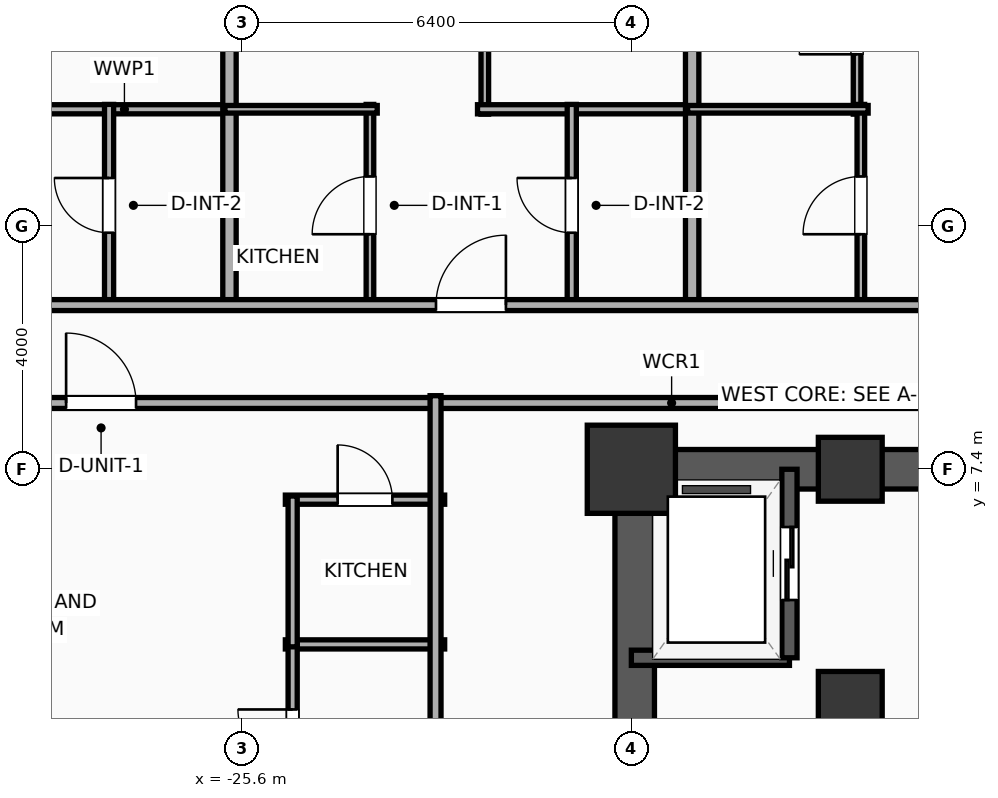
"""IFC4 building model, lengths in metres.
Left out: names, types, materials, properties, quantities, classifications, styles, units other than length and angle.
Written with IfcOpenShell. Run it as: python <this file> out.ifc"""

import sys

from ifc_helpers import new_model, si_unit, direction, frame, frame_2d, origin, origin_2d, place, context, subcontext, project, spatial, rectangle, extrude, element, fill, save


model = new_model("IFC4")
c1 = context("Model", 3, precision=1e-05, world=origin(), true_north=direction((0.0, 1.0)))
c2 = subcontext(c1, "Body", "Model", "MODEL_VIEW")
j1 = project(units=[si_unit("LENGTHUNIT", "METRE"), si_unit("PLANEANGLEUNIT", "RADIAN")], contexts=[c1])
p1 = place(None, origin())
s1 = spatial("IfcSite", under=j1, at=p1, CompositionType="ELEMENT")
p2 = place(p1, origin())
s2 = spatial("IfcBuilding", under=s1, at=p2, CompositionType="ELEMENT")
p3 = place(p2, frame((0.0, 0.0, 45.5)))
s3 = spatial("IfcBuildingStorey", under=s2, at=p3, CompositionType="ELEMENT", Elevation=45.5)
p4 = place(p3, frame((-19.2, 7.4, 0.0), z_axis=(0.0, 0.0, 1.0), x_axis=(1.0, 0.0, 0.0)))
e1 = element("IfcColumn", 1, at=p4, inside=s3, PredefinedType="COLUMN", context=c2, shape_type="SweptSolid", body=[
    extrude(rectangle(XDim=1.45, YDim=1.45, at=origin_2d()), origin(), (0.0, 0.0, 1.0), 3.9),
])
for number, where, z_axis, x_axis in (
    (2, (-15.6, 7.4, 0.0), (0.0, 0.0, 1.0), (1.0, 0.0, 0.0)),
    (3, (-15.6, 3.55, 0.0), (0.0, 0.0, 1.0), (1.0, 0.0, 0.0)),
):
    element("IfcColumn", number, at=place(p3, frame(where, z_axis=z_axis, x_axis=x_axis)), inside=s3, PredefinedType="COLUMN", context=c2, shape_type="SweptSolid", body=[
        extrude(rectangle(XDim=1.05, YDim=1.05, at=origin_2d()), origin(), (0.0, 0.0, 1.0), 3.9),
    ])
p5 = place(p3, frame((-19.525, 7.4, 0.0), z_axis=(0.0, 0.0, 1.0), x_axis=(1.0, 0.0, 0.0)))
e4 = element("IfcWall", 4, at=p5, inside=s3, PredefinedType="SHEAR", context=c2, shape_type="SweptSolid", body=[
    extrude(rectangle(XDim=7.45, YDim=0.65, at=frame_2d((3.725, 0.0))), origin(), (0.0, 0.0, 1.0), 3.65),
])
p6 = place(p3, frame((-19.145, -7.4, 0.0), z_axis=(0.0, 0.0, 1.0), x_axis=(0.0, 1.0, 0.0)))
e5 = element("IfcWall", 5, at=p6, inside=s3, PredefinedType="SHEAR", context=c2, shape_type="SweptSolid", body=[
    extrude(rectangle(XDim=14.8, YDim=0.65, at=frame_2d((7.4, 0.0))), origin(), (0.0, 0.0, 1.0), 3.65),
])
p7 = place(p3, frame((-19.2, 4.3, 0.0), z_axis=(0.0, 0.0, 1.0), x_axis=(1.0, 0.0, 0.0)))
e6 = element("IfcWall", 6, at=p7, inside=s3, PredefinedType="SOLIDWALL", context=c2, shape_type="SweptSolid", body=[
    extrude(rectangle(XDim=2.6, YDim=0.25, at=frame_2d((1.3, 0.0))), origin(), (0.0, 0.0, 1.0), 3.65),
])
p8 = place(p3, frame((-16.6, 4.3, 0.0), z_axis=(0.0, 0.0, 1.0), x_axis=(0.0, 1.0, 0.0)))
e7 = element("IfcWall", 7, at=p8, inside=s3, PredefinedType="SOLIDWALL", context=c2, shape_type="SweptSolid", body=[
    extrude(rectangle(XDim=3.1, YDim=0.25, at=frame_2d((1.55, 0.0))), origin(), (0.0, 0.0, 1.0), 3.65),
])
p9 = place(p8, frame((0.95, 0.0, 0.0)))
e8 = element("IfcOpeningElement", 8, at=p9, cuts=e7, PredefinedType="OPENING", context=c2, shape_type="SweptSolid", body=[
    extrude(rectangle(XDim=1.2, YDim=2.05, at=frame_2d((0.6, 1.025))), frame((0.0, 0.135, 0.0), z_axis=(0.0, -1.0, 0.0), x_axis=(1.0, 0.0, 0.0)), (0.0, 0.0, 1.0), 0.27),
])
p10 = place(p3, frame((-33.41, 8.49, 0.0), z_axis=(0.0, 0.0, 1.0), x_axis=(1.0, 0.0, 0.0)))
e9 = element("IfcWall", 9, at=p10, inside=s3, PredefinedType="PARTITIONING", context=c2, shape_type="SweptSolid", body=[
    extrude(rectangle(XDim=23.53, YDim=0.18, at=frame_2d((11.765, 0.0))), origin(), (0.0, 0.0, 1.0), 3.65),
])
p11 = place(p10, frame((4.915, 0.0, 0.0)))
e10 = element("IfcOpeningElement", 10, at=p11, cuts=e9, PredefinedType="OPENING", context=c2, shape_type="SweptSolid", body=[
    extrude(rectangle(XDim=1.15, YDim=2.05, at=frame_2d((0.575, 1.025))), frame((0.0, 0.1, 0.0), z_axis=(0.0, -1.0, 0.0), x_axis=(1.0, 0.0, 0.0)), (0.0, 0.0, 1.0), 0.2),
])
p12 = place(p3, frame((-29.339, 13.32, 0.0), z_axis=(0.0, 0.0, 1.0), x_axis=(1.0, 0.0, 0.0)))
e11 = element("IfcWall", 11, at=p12, inside=s3, PredefinedType="PLUMBINGWALL", context=c2, shape_type="SweptSolid", body=[
    extrude(rectangle(XDim=3.605, YDim=0.15, at=frame_2d((1.803, 0.0))), origin(), (0.0, 0.0, 1.0), 3.65),
])
p13 = place(p3, frame((-27.789, 10.08, 0.0), z_axis=(0.0, 0.0, 1.0), x_axis=(0.0, 1.0, 0.0)))
e12 = element("IfcWall", 12, at=p13, inside=s3, PredefinedType="PLUMBINGWALL", context=c2, shape_type="SweptSolid", body=[
    extrude(rectangle(XDim=3.32, YDim=0.15, at=frame_2d((1.66, 0.0))), origin(), (0.0, 0.0, 1.0), 3.65),
])
p14 = place(p13, frame((1.21, 0.0, 0.0)))
e13 = element("IfcOpeningElement", 13, at=p14, cuts=e12, PredefinedType="OPENING", context=c2, shape_type="SweptSolid", body=[
    extrude(rectangle(XDim=0.9, YDim=2.05, at=frame_2d((0.45, 1.025))), frame((0.0, 0.085, 0.0), z_axis=(0.0, -1.0, 0.0), x_axis=(1.0, 0.0, 0.0)), (0.0, 0.0, 1.0), 0.17),
])
p15 = place(p3, frame((-25.809, 10.02, 0.0), z_axis=(0.0, 0.0, 1.0), x_axis=(0.0, 1.0, 0.0)))
e14 = element("IfcWall", 14, at=p15, inside=s3, PredefinedType="PARTITIONING", context=c2, shape_type="SweptSolid", body=[
    extrude(rectangle(XDim=12.19, YDim=0.22, at=frame_2d((6.095, 0.0))), origin(), (0.0, 0.0, 1.0), 3.65),
])
p16 = place(p3, frame((-21.61, 13.24, 0.0), z_axis=(0.0, 0.0, 1.0), x_axis=(0.0, 1.0, 0.0)))
e15 = element("IfcWall", 15, at=p16, inside=s3, PredefinedType="PARTITIONING", context=c2, shape_type="SweptSolid", body=[
    extrude(rectangle(XDim=9.12, YDim=0.125, at=frame_2d((4.56, 0.0))), origin(), (0.0, 0.0, 1.0), 3.65),
])
p17 = place(p16, frame((1.739, 0.0, 0.0)))
e16 = element("IfcOpeningElement", 16, at=p17, cuts=e15, PredefinedType="OPENING", context=c2, shape_type="SweptSolid", body=[
    extrude(rectangle(XDim=0.9, YDim=2.05, at=frame_2d((0.45, 1.025))), frame((0.0, 0.073, 0.0), z_axis=(0.0, -1.0, 0.0), x_axis=(1.0, 0.0, 0.0)), (0.0, 0.0, 1.0), 0.145),
])
p18 = place(p3, frame((-21.73, 13.32, 0.0), z_axis=(0.0, 0.0, 1.0), x_axis=(1.0, 0.0, 0.0)))
e17 = element("IfcWall", 17, at=p18, inside=s3, PredefinedType="PLUMBINGWALL", context=c2, shape_type="SweptSolid", body=[
    extrude(rectangle(XDim=3.605, YDim=0.15, at=frame_2d((1.802, 0.0))), origin(), (0.0, 0.0, 1.0), 3.65),
])
p19 = place(p3, frame((-23.499, 10.08, 0.0), z_axis=(0.0, 0.0, 1.0), x_axis=(0.0, 1.0, 0.0)))
e18 = element("IfcWall", 18, at=p19, inside=s3, PredefinedType="PARTITIONING", context=c2, shape_type="SweptSolid", body=[
    extrude(rectangle(XDim=3.32, YDim=0.125, at=frame_2d((1.66, 0.0))), origin(), (0.0, 0.0, 1.0), 3.65),
])
p20 = place(p19, frame((1.185, 0.0, 0.0)))
e19 = element("IfcOpeningElement", 19, at=p20, cuts=e18, PredefinedType="OPENING", context=c2, shape_type="SweptSolid", body=[
    extrude(rectangle(XDim=0.95, YDim=2.05, at=frame_2d((0.475, 1.025))), frame((0.0, 0.073, 0.0), z_axis=(0.0, -1.0, 0.0), x_axis=(1.0, 0.0, 0.0)), (0.0, 0.0, 1.0), 0.145),
])
p21 = place(p3, frame((-25.884, 13.32, 0.0), z_axis=(0.0, 0.0, 1.0), x_axis=(1.0, 0.0, 0.0)))
e20 = element("IfcWall", 20, at=p21, inside=s3, PredefinedType="PARTITIONING", context=c2, shape_type="SweptSolid", body=[
    extrude(rectangle(XDim=2.505, YDim=0.125, at=frame_2d((1.252, 0.0))), origin(), (0.0, 0.0, 1.0), 3.65),
])
p22 = place(p3, frame((-20.18, 10.08, 0.0), z_axis=(0.0, 0.0, 1.0), x_axis=(0.0, 1.0, 0.0)))
e21 = element("IfcWall", 21, at=p22, inside=s3, PredefinedType="PLUMBINGWALL", context=c2, shape_type="SweptSolid", body=[
    extrude(rectangle(XDim=3.32, YDim=0.15, at=frame_2d((1.66, 0.0))), origin(), (0.0, 0.0, 1.0), 3.65),
])
p23 = place(p22, frame((1.21, 0.0, 0.0)))
e22 = element("IfcOpeningElement", 22, at=p23, cuts=e21, PredefinedType="OPENING", context=c2, shape_type="SweptSolid", body=[
    extrude(rectangle(XDim=0.9, YDim=2.05, at=frame_2d((0.45, 1.025))), frame((0.0, 0.085, 0.0), z_axis=(0.0, -1.0, 0.0), x_axis=(1.0, 0.0, 0.0)), (0.0, 0.0, 1.0), 0.17),
])
p24 = place(p3, frame((-18.2, 10.02, 0.0), z_axis=(0.0, 0.0, 1.0), x_axis=(0.0, 1.0, 0.0)))
e23 = element("IfcWall", 23, at=p24, inside=s3, PredefinedType="PARTITIONING", context=c2, shape_type="SweptSolid", body=[
    extrude(rectangle(XDim=12.19, YDim=0.22, at=frame_2d((6.095, 0.0))), origin(), (0.0, 0.0, 1.0), 3.65),
])
p25 = place(p3, frame((-15.488, 13.24, 0.0), z_axis=(0.0, 0.0, 1.0), x_axis=(0.0, 1.0, 0.0)))
e24 = element("IfcWall", 24, at=p25, inside=s3, PredefinedType="PARTITIONING", context=c2, shape_type="SweptSolid", body=[
    extrude(rectangle(XDim=9.12, YDim=0.125, at=frame_2d((4.56, 0.0))), origin(), (0.0, 0.0, 1.0), 3.65),
])
p26 = place(p25, frame((0.984, 0.0, 0.0)))
e25 = element("IfcOpeningElement", 25, at=p26, cuts=e24, PredefinedType="OPENING", context=c2, shape_type="SweptSolid", body=[
    extrude(rectangle(XDim=0.95, YDim=2.05, at=frame_2d((0.475, 1.025))), frame((0.0, 0.073, 0.0), z_axis=(0.0, -1.0, 0.0), x_axis=(1.0, 0.0, 0.0)), (0.0, 0.0, 1.0), 0.145),
])
p27 = place(p3, frame((-15.426, 10.08, 0.0), z_axis=(0.0, 0.0, 1.0), x_axis=(0.0, 1.0, 0.0)))
e26 = element("IfcWall", 26, at=p27, inside=s3, PredefinedType="PARTITIONING", context=c2, shape_type="SweptSolid", body=[
    extrude(rectangle(XDim=3.32, YDim=0.125, at=frame_2d((1.66, 0.0))), origin(), (0.0, 0.0, 1.0), 3.65),
])
p28 = place(p27, frame((1.185, 0.0, 0.0)))
e27 = element("IfcOpeningElement", 27, at=p28, cuts=e26, PredefinedType="OPENING", context=c2, shape_type="SweptSolid", body=[
    extrude(rectangle(XDim=0.95, YDim=2.05, at=frame_2d((0.475, 1.025))), frame((0.0, 0.073, 0.0), z_axis=(0.0, -1.0, 0.0), x_axis=(1.0, 0.0, 0.0)), (0.0, 0.0, 1.0), 0.145),
])
p29 = place(p3, frame((-18.275, 13.32, 0.0), z_axis=(0.0, 0.0, 1.0), x_axis=(1.0, 0.0, 0.0)))
e28 = element("IfcWall", 28, at=p29, inside=s3, PredefinedType="PARTITIONING", context=c2, shape_type="SweptSolid", body=[
    extrude(rectangle(XDim=2.969, YDim=0.125, at=frame_2d((1.484, 0.0))), origin(), (0.0, 0.0, 1.0), 3.65),
])
p30 = place(p3, frame((-33.41, 10.1, 0.0), z_axis=(0.0, 0.0, 1.0), x_axis=(1.0, 0.0, 0.0)))
e29 = element("IfcWall", 29, at=p30, inside=s3, PredefinedType="PARTITIONING", context=c2, shape_type="SweptSolid", body=[
    extrude(rectangle(XDim=59.62, YDim=0.18, at=frame_2d((29.81, 0.0))), origin(), (0.0, 0.0, 1.0), 3.65),
])
p31 = place(p30, frame((3.354, 0.0, 0.0)))
e30 = element("IfcOpeningElement", 30, at=p31, cuts=e29, PredefinedType="OPENING", context=c2, shape_type="SweptSolid", body=[
    extrude(rectangle(XDim=1.15, YDim=2.05, at=frame_2d((0.575, 1.025))), frame((0.0, 0.1, 0.0), z_axis=(0.0, -1.0, 0.0), x_axis=(1.0, 0.0, 0.0)), (0.0, 0.0, 1.0), 0.2),
])
p32 = place(p30, frame((10.997, 0.0, 0.0)))
e31 = element("IfcOpeningElement", 31, at=p32, cuts=e29, PredefinedType="OPENING", context=c2, shape_type="SweptSolid", body=[
    extrude(rectangle(XDim=1.15, YDim=2.05, at=frame_2d((0.575, 1.025))), frame((0.0, 0.1, 0.0), z_axis=(0.0, -1.0, 0.0), x_axis=(1.0, 0.0, 0.0)), (0.0, 0.0, 1.0), 0.2),
])
p33 = place(p30, frame((20.232, 0.0, 0.0)))
e32 = element("IfcOpeningElement", 32, at=p33, cuts=e29, PredefinedType="OPENING", context=c2, shape_type="SweptSolid", body=[
    extrude(rectangle(XDim=1.15, YDim=2.05, at=frame_2d((0.575, 1.025))), frame((0.0, 0.1, 0.0), z_axis=(0.0, -1.0, 0.0), x_axis=(1.0, 0.0, 0.0)), (0.0, 0.0, 1.0), 0.2),
])
p34 = place(p30, frame((30.38, 0.0, 0.0)))
e33 = element("IfcOpeningElement", 33, at=p34, cuts=e29, PredefinedType="OPENING", context=c2, shape_type="SweptSolid", body=[
    extrude(rectangle(XDim=1.15, YDim=2.05, at=frame_2d((0.575, 1.025))), frame((0.0, 0.1, 0.0), z_axis=(0.0, -1.0, 0.0), x_axis=(1.0, 0.0, 0.0)), (0.0, 0.0, 1.0), 0.2),
])
p35 = place(p30, frame((40.998, 0.0, 0.0)))
e34 = element("IfcOpeningElement", 34, at=p35, cuts=e29, PredefinedType="OPENING", context=c2, shape_type="SweptSolid", body=[
    extrude(rectangle(XDim=1.15, YDim=2.05, at=frame_2d((0.575, 1.025))), frame((0.0, 0.1, 0.0), z_axis=(0.0, -1.0, 0.0), x_axis=(1.0, 0.0, 0.0)), (0.0, 0.0, 1.0), 0.2),
])
p36 = place(p30, frame((49.428, 0.0, 0.0)))
e35 = element("IfcOpeningElement", 35, at=p36, cuts=e29, PredefinedType="OPENING", context=c2, shape_type="SweptSolid", body=[
    extrude(rectangle(XDim=0.9, YDim=2.05, at=frame_2d((0.45, 1.025))), frame((0.0, 0.1, 0.0), z_axis=(0.0, -1.0, 0.0), x_axis=(1.0, 0.0, 0.0)), (0.0, 0.0, 1.0), 0.2),
])
p37 = place(p30, frame((56.07, 0.0, 0.0)))
e36 = element("IfcOpeningElement", 36, at=p37, cuts=e29, PredefinedType="OPENING", context=c2, shape_type="SweptSolid", body=[
    extrude(rectangle(XDim=0.9, YDim=2.05, at=frame_2d((0.45, 1.025))), frame((0.0, 0.1, 0.0), z_axis=(0.0, -1.0, 0.0), x_axis=(1.0, 0.0, 0.0)), (0.0, 0.0, 1.0), 0.2),
])
p38 = place(p3, frame((-24.89, 6.9, 0.0), z_axis=(0.0, 0.0, 1.0), x_axis=(1.0, 0.0, 0.0)))
e37 = element("IfcWall", 37, at=p38, inside=s3, PredefinedType="PLUMBINGWALL", context=c2, shape_type="SweptSolid", body=[
    extrude(rectangle(XDim=2.62, YDim=0.15, at=frame_2d((1.31, 0.0))), origin(), (0.0, 0.0, 1.0), 3.65),
])
p39 = place(p38, frame((0.86, 0.0, 0.0)))
e38 = element("IfcOpeningElement", 38, at=p39, cuts=e37, PredefinedType="OPENING", context=c2, shape_type="SweptSolid", body=[
    extrude(rectangle(XDim=0.9, YDim=2.05, at=frame_2d((0.45, 1.025))), frame((0.0, 0.085, 0.0), z_axis=(0.0, -1.0, 0.0), x_axis=(1.0, 0.0, 0.0)), (0.0, 0.0, 1.0), 0.17),
])
p40 = place(p3, frame((-24.89, 4.52, 0.0), z_axis=(0.0, 0.0, 1.0), x_axis=(1.0, 0.0, 0.0)))
e39 = element("IfcWall", 39, at=p40, inside=s3, PredefinedType="PLUMBINGWALL", context=c2, shape_type="SweptSolid", body=[
    extrude(rectangle(XDim=2.62, YDim=0.15, at=frame_2d((1.31, 0.0))), origin(), (0.0, 0.0, 1.0), 3.65),
])
p41 = place(p3, frame((-24.77, 1.44, 0.0), z_axis=(0.0, 0.0, 1.0), x_axis=(0.0, 1.0, 0.0)))
e40 = element("IfcWall", 40, at=p41, inside=s3, PredefinedType="PLUMBINGWALL", context=c2, shape_type="SweptSolid", body=[
    extrude(rectangle(XDim=3.12, YDim=0.15, at=frame_2d((1.56, 0.0))), origin(), (0.0, 0.0, 1.0), 3.65),
])
p42 = place(p41, frame((1.11, 0.0, 0.0)))
e41 = element("IfcOpeningElement", 41, at=p42, cuts=e40, PredefinedType="OPENING", context=c2, shape_type="SweptSolid", body=[
    extrude(rectangle(XDim=0.9, YDim=2.05, at=frame_2d((0.45, 1.025))), frame((0.0, 0.085, 0.0), z_axis=(0.0, -1.0, 0.0), x_axis=(1.0, 0.0, 0.0)), (0.0, 0.0, 1.0), 0.17),
])
p43 = place(p3, frame((-24.77, 4.48, 0.0), z_axis=(0.0, 0.0, 1.0), x_axis=(0.0, 1.0, 0.0)))
e42 = element("IfcWall", 42, at=p43, inside=s3, PredefinedType="PLUMBINGWALL", context=c2, shape_type="SweptSolid", body=[
    extrude(rectangle(XDim=2.48, YDim=0.15, at=frame_2d((1.24, 0.0))), origin(), (0.0, 0.0, 1.0), 3.65),
])
p44 = place(p3, frame((-22.42, -8.61, 0.0), z_axis=(0.0, 0.0, 1.0), x_axis=(0.0, 1.0, 0.0)))
e43 = element("IfcWall", 43, at=p44, inside=s3, PredefinedType="PARTITIONING", context=c2, shape_type="SweptSolid", body=[
    extrude(rectangle(XDim=17.22, YDim=0.18, at=frame_2d((8.61, 0.0))), origin(), (0.0, 0.0, 1.0), 3.65),
])
p45 = place(p9, origin())
e44 = element("IfcDoor", 44, at=p45, inside=s3, OperationType="SLIDING_TO_LEFT", PredefinedType="DOOR", context=c2, shape_type="SweptSolid", body=[
    extrude(rectangle(XDim=1.2, YDim=2.05, at=frame_2d((0.6, 1.025))), frame((0.0, 0.025, 0.0), z_axis=(0.0, -1.0, 0.0), x_axis=(1.0, 0.0, 0.0)), (0.0, 0.0, 1.0), 0.05),
])
fill(e8, e44)
p46 = place(p11, origin())
e45 = element("IfcDoor", 45, at=p46, inside=s3, OperationType="SINGLE_SWING_LEFT", PredefinedType="DOOR", context=c2, shape_type="SweptSolid", body=[
    extrude(rectangle(XDim=1.15, YDim=2.05, at=frame_2d((0.575, 1.025))), frame((0.0, 0.025, 0.0), z_axis=(0.0, -1.0, 0.0), x_axis=(1.0, 0.0, 0.0)), (0.0, 0.0, 1.0), 0.05),
])
fill(e10, e45)
p47 = place(p14, origin())
e46 = element("IfcDoor", 46, at=p47, inside=s3, OperationType="SINGLE_SWING_RIGHT", PredefinedType="DOOR", context=c2, shape_type="SweptSolid", body=[
    extrude(rectangle(XDim=0.9, YDim=2.05, at=frame_2d((0.45, 1.025))), frame((0.0, 0.025, 0.0), z_axis=(0.0, -1.0, 0.0), x_axis=(1.0, 0.0, 0.0)), (0.0, 0.0, 1.0), 0.05),
])
fill(e13, e46)
p48 = place(p20, origin())
e47 = element("IfcDoor", 47, at=p48, inside=s3, OperationType="SINGLE_SWING_LEFT", PredefinedType="DOOR", context=c2, shape_type="SweptSolid", body=[
    extrude(rectangle(XDim=0.95, YDim=2.05, at=frame_2d((0.475, 1.025))), frame((0.0, 0.025, 0.0), z_axis=(0.0, -1.0, 0.0), x_axis=(1.0, 0.0, 0.0)), (0.0, 0.0, 1.0), 0.05),
])
fill(e19, e47)
p49 = place(p23, origin())
e48 = element("IfcDoor", 48, at=p49, inside=s3, OperationType="SINGLE_SWING_RIGHT", PredefinedType="DOOR", context=c2, shape_type="SweptSolid", body=[
    extrude(rectangle(XDim=0.9, YDim=2.05, at=frame_2d((0.45, 1.025))), frame((0.0, 0.025, 0.0), z_axis=(0.0, -1.0, 0.0), x_axis=(1.0, 0.0, 0.0)), (0.0, 0.0, 1.0), 0.05),
])
fill(e22, e48)
p50 = place(p26, origin())
e49 = element("IfcDoor", 49, at=p50, inside=s3, OperationType="SINGLE_SWING_LEFT", PredefinedType="DOOR", context=c2, shape_type="SweptSolid", body=[
    extrude(rectangle(XDim=0.95, YDim=2.05, at=frame_2d((0.475, 1.025))), frame((0.0, 0.025, 0.0), z_axis=(0.0, -1.0, 0.0), x_axis=(1.0, 0.0, 0.0)), (0.0, 0.0, 1.0), 0.05),
])
fill(e25, e49)
p51 = place(p28, origin())
e50 = element("IfcDoor", 50, at=p51, inside=s3, OperationType="SINGLE_SWING_LEFT", PredefinedType="DOOR", context=c2, shape_type="SweptSolid", body=[
    extrude(rectangle(XDim=0.95, YDim=2.05, at=frame_2d((0.475, 1.025))), frame((0.0, 0.025, 0.0), z_axis=(0.0, -1.0, 0.0), x_axis=(1.0, 0.0, 0.0)), (0.0, 0.0, 1.0), 0.05),
])
fill(e27, e50)
p52 = place(p32, origin())
e51 = element("IfcDoor", 51, at=p52, inside=s3, OperationType="SINGLE_SWING_RIGHT", PredefinedType="DOOR", context=c2, shape_type="SweptSolid", body=[
    extrude(rectangle(XDim=1.15, YDim=2.05, at=frame_2d((0.575, 1.025))), frame((0.0, 0.025, 0.0), z_axis=(0.0, -1.0, 0.0), x_axis=(1.0, 0.0, 0.0)), (0.0, 0.0, 1.0), 0.05),
])
fill(e31, e51)
p53 = place(p39, origin())
e52 = element("IfcDoor", 52, at=p53, inside=s3, OperationType="SINGLE_SWING_LEFT", PredefinedType="DOOR", context=c2, shape_type="SweptSolid", body=[
    extrude(rectangle(XDim=0.9, YDim=2.05, at=frame_2d((0.45, 1.025))), frame((0.0, 0.025, 0.0), z_axis=(0.0, -1.0, 0.0), x_axis=(1.0, 0.0, 0.0)), (0.0, 0.0, 1.0), 0.05),
])
fill(e38, e52)
p54 = place(p42, origin())
e53 = element("IfcDoor", 53, at=p54, inside=s3, OperationType="SINGLE_SWING_RIGHT", PredefinedType="DOOR", context=c2, shape_type="SweptSolid", body=[
    extrude(rectangle(XDim=0.9, YDim=2.05, at=frame_2d((0.45, 1.025))), frame((0.0, 0.025, 0.0), z_axis=(0.0, -1.0, 0.0), x_axis=(1.0, 0.0, 0.0)), (0.0, 0.0, 1.0), 0.05),
])
fill(e41, e53)
save(model, sys.argv[1])
